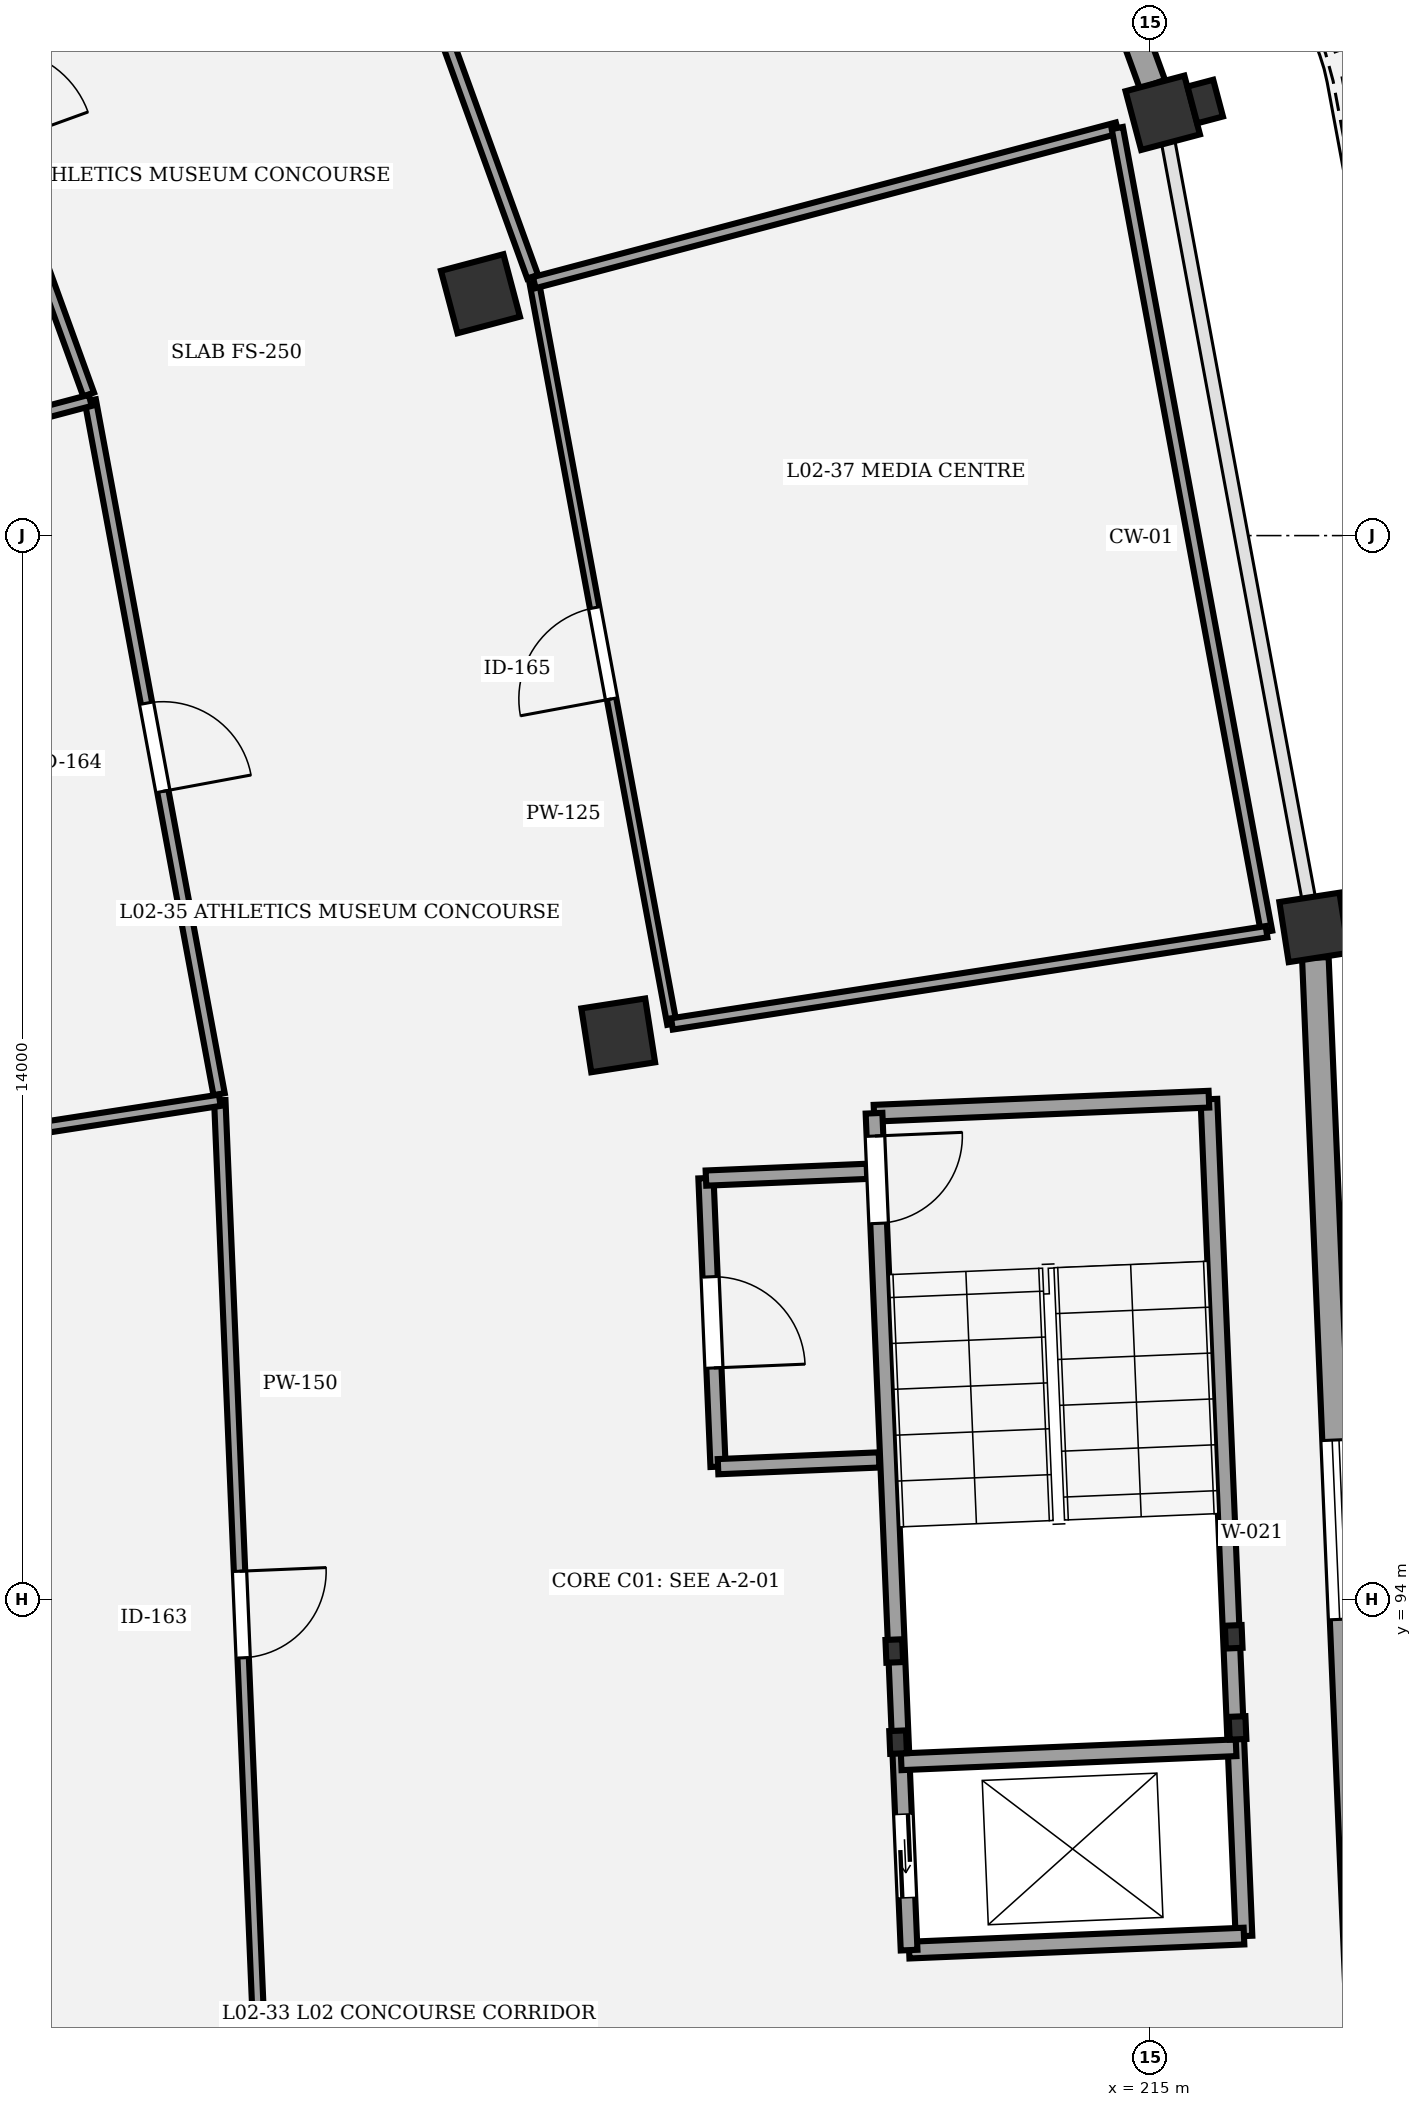
"""IFC4 building model, lengths in metres.
Left out: names, types, materials, properties, quantities, classifications, styles, units other than length and angle.
Written with IfcOpenShell. Run it as: python <this file> out.ifc"""

import sys

from ifc_helpers import new_model, si_unit, direction, frame, frame_2d, origin, origin_2d, place, context, subcontext, project, spatial, rectangle, extrude, element, fill, save


model = new_model("IFC4")
c1 = context("Model", 3, precision=1e-05, world=origin(), true_north=direction((0.0, 1.0)))
c2 = subcontext(c1, "Body", "Model", "MODEL_VIEW")
j1 = project(units=[si_unit("LENGTHUNIT", "METRE"), si_unit("PLANEANGLEUNIT", "RADIAN")], contexts=[c1])
p1 = place(None, origin())
s1 = spatial("IfcSite", under=j1, at=p1, CompositionType="ELEMENT")
p2 = place(p1, origin())
s2 = spatial("IfcBuilding", under=s1, at=p2, CompositionType="ELEMENT")
p3 = place(p2, frame((0.0, 0.0, 10.2)))
s3 = spatial("IfcBuildingStorey", under=s2, at=p3, CompositionType="ELEMENT", Elevation=10.2)
p4 = place(p3, frame((208.0, 101.425, 0.0), z_axis=(0.0, 0.0, 1.0), x_axis=(0.98817491911, 0.153330783737, 0.0)))
e1 = element("IfcColumn", 1, at=p4, inside=s3, PredefinedType="COLUMN", context=c2, shape_type="SweptSolid", body=[
    extrude(rectangle(XDim=0.85, YDim=0.85, at=origin_2d()), origin(), (0.0, 0.0, 1.0), 4.5),
])
p5 = place(p3, frame((217.156, 102.845, 0.0), z_axis=(0.0, 0.0, 1.0), x_axis=(0.98817491911, 0.153330783737, 0.0)))
e2 = element("IfcColumn", 2, at=p5, inside=s3, PredefinedType="COLUMN", context=c2, shape_type="SweptSolid", body=[
    extrude(rectangle(XDim=0.8, YDim=0.8, at=origin_2d()), origin(), (0.0, 0.0, 1.0), 4.5),
])
p6 = place(p3, frame((206.188, 111.182, 0.0), z_axis=(0.0, 0.0, 1.0), x_axis=(0.966600102017, 0.256289373133, 0.0)))
e3 = element("IfcColumn", 3, at=p6, inside=s3, PredefinedType="COLUMN", context=c2, shape_type="SweptSolid", body=[
    extrude(rectangle(XDim=0.85, YDim=0.85, at=origin_2d()), origin(), (0.0, 0.0, 1.0), 4.5),
])
p7 = place(p3, frame((215.165, 113.562, 0.0), z_axis=(0.0, 0.0, 1.0), x_axis=(0.966600102017, 0.256289373133, 0.0)))
e4 = element("IfcColumn", 4, at=p7, inside=s3, PredefinedType="COLUMN", context=c2, shape_type="SweptSolid", body=[
    extrude(rectangle(XDim=0.8, YDim=0.8, at=origin_2d()), origin(), (0.0, 0.0, 1.0), 4.5),
])
p8 = place(p3, frame((215.723, 113.711, 0.0), z_axis=(0.0, 0.0, 1.0), x_axis=(-0.256289373133, 0.966600102017, 0.0)))
e5 = element("IfcColumn", 5, at=p8, inside=s3, PredefinedType="PILASTER", context=c2, shape_type="SweptSolid", body=[
    extrude(rectangle(XDim=0.5, YDim=0.35, at=origin_2d()), origin(), (0.0, 0.0, 1.0), 4.5),
])
p9 = place(p3, frame((217.803, 87.398, 0.0), z_axis=(0.0, 0.0, 1.0), x_axis=(-0.041898189147, 0.99912188533, 0.0)))
e6 = element("IfcWall", 6, at=p9, inside=s3, PredefinedType="STANDARD", context=c2, shape_type="SweptSolid", body=[
    extrude(rectangle(XDim=15.063, YDim=0.35, at=frame_2d((7.531, 0.0))), origin(), (0.0, 0.0, 1.0), 3.42),
])
p10 = place(p9, frame((6.351, 0.0, 0.9)))
e7 = element("IfcOpeningElement", 7, at=p10, cuts=e6, PredefinedType="OPENING", context=c2, shape_type="SweptSolid", body=[
    extrude(rectangle(XDim=2.36, YDim=1.75, at=frame_2d((1.18, 0.875))), frame((0.0, 0.185, 0.0), z_axis=(0.0, -1.0, 0.0), x_axis=(1.0, 0.0, 0.0)), (0.0, 0.0, 1.0), 0.37),
])
p11 = place(p3, frame((211.992, 122.308, 0.0), z_axis=(0.0, 0.0, 1.0), x_axis=(0.34103858998, -0.940049296657, 0.0)))
e8 = element("IfcWall", 8, at=p11, inside=s3, PredefinedType="STANDARD", context=c2, shape_type="SweptSolid", body=[
    extrude(rectangle(XDim=8.906, YDim=0.35, at=frame_2d((4.453, 0.0))), origin(), (0.0, 0.0, 1.0), 3.42),
])
p12 = place(p11, frame((3.553, 0.0, 0.0)))
e9 = element("IfcOpeningElement", 9, at=p12, cuts=e8, PredefinedType="OPENING", context=c2, shape_type="SweptSolid", body=[
    extrude(rectangle(XDim=1.8, YDim=2.4, at=frame_2d((0.9, 1.2))), frame((0.0, 0.185, 0.0), z_axis=(0.0, -1.0, 0.0), x_axis=(1.0, 0.0, 0.0)), (0.0, 0.0, 1.0), 0.37),
])
for number, where, z_axis, x_axis in (
    (10, (211.632, 93.325, 0.0), (0.0, 0.0, 1.0), (0.042, -0.999, 0.0)),
    (11, (211.682, 92.126, 0.0), (0.0, 0.0, 1.0), (0.042, -0.999, 0.0)),
    (12, (216.148, 92.314, 0.0), (0.0, 0.0, 1.0), (0.042, -0.999, 0.0)),
    (13, (216.098, 93.513, 0.0), (0.0, 0.0, 1.0), (0.042, -0.999, 0.0)),
):
    element("IfcColumn", number, at=place(p3, frame(where, z_axis=z_axis, x_axis=x_axis)), inside=s3, PredefinedType="COLUMN", context=c2, shape_type="SweptSolid", body=[
        extrude(rectangle(XDim=0.3, YDim=0.22, at=origin_2d()), origin(), (0.0, 0.0, 1.0), 4.5),
    ])
p13 = place(p3, frame((215.772, 100.585, 0.0), z_axis=(0.0, 0.0, 1.0), x_axis=(0.041871977473, -0.999122984173, 0.0)))
e14 = element("IfcWall", 14, at=p13, inside=s3, PredefinedType="SHEAR", context=c2, shape_type="SweptSolid", body=[
    extrude(rectangle(XDim=11.02, YDim=0.22, at=frame_2d((5.51, 0.0))), origin(), (0.0, 0.0, 1.0), 4.25),
])
for number, where, z_axis, x_axis in (
    (15, (211.365, 100.4, 0.0), (0.0, 0.0, 1.0), (0.999, 0.042, 0.0)),
    (16, (211.827, 89.39, 0.0), (0.0, 0.0, 1.0), (0.999, 0.042, 0.0)),
):
    element("IfcWall", number, at=place(p3, frame(where, z_axis=z_axis, x_axis=x_axis)), inside=s3, PredefinedType="SHEAR", context=c2, shape_type="SweptSolid", body=[
        extrude(rectangle(XDim=4.41, YDim=0.22, at=frame_2d((2.205, 0.0))), origin(), (0.0, 0.0, 1.0), 4.25),
    ])
p14 = place(p3, frame((211.365, 100.4, 0.0), z_axis=(0.0, 0.0, 1.0), x_axis=(0.041871977473, -0.999122984173, 0.0)))
e17 = element("IfcWall", 17, at=p14, inside=s3, PredefinedType="SHEAR", context=c2, shape_type="SweptSolid", body=[
    extrude(rectangle(XDim=11.02, YDim=0.22, at=frame_2d((5.51, 0.0))), origin(), (0.0, 0.0, 1.0), 4.25),
])
p15 = place(p14, frame((0.3, 0.0, 0.0)))
e18 = element("IfcOpeningElement", 18, at=p15, cuts=e17, PredefinedType="OPENING", context=c2, shape_type="SweptSolid", body=[
    extrude(rectangle(XDim=1.15, YDim=2.15, at=frame_2d((0.575, 1.075))), frame((0.0, 0.12, 0.0), z_axis=(0.0, -1.0, 0.0), x_axis=(1.0, 0.0, 0.0)), (0.0, 0.0, 1.0), 0.24),
])
p16 = place(p14, frame((9.23, 0.0, 0.0)))
e19 = element("IfcOpeningElement", 19, at=p16, cuts=e17, PredefinedType="OPENING", context=c2, shape_type="SweptSolid", body=[
    extrude(rectangle(XDim=1.1, YDim=2.15, at=frame_2d((0.55, 1.075))), frame((0.0, 0.12, 0.0), z_axis=(0.0, -1.0, 0.0), x_axis=(1.0, 0.0, 0.0)), (0.0, 0.0, 1.0), 0.24),
])
p17 = place(p3, frame((211.723, 91.868, 0.0), z_axis=(0.0, 0.0, 1.0), x_axis=(0.999121521721, 0.041906859039, 0.0)))
e20 = element("IfcWall", 20, at=p17, inside=s3, PredefinedType="SHEAR", context=c2, shape_type="SweptSolid", body=[
    extrude(rectangle(XDim=4.41, YDim=0.22, at=frame_2d((2.205, 0.0))), origin(), (0.0, 0.0, 1.0), 4.25),
])
p18 = place(p3, frame((209.154, 99.547, 0.0), z_axis=(0.0, 0.0, 1.0), x_axis=(0.041889762691, -0.999122238658, 0.0)))
e21 = element("IfcWall", 21, at=p18, inside=s3, PredefinedType="PARTITIONING", context=c2, shape_type="SweptSolid", body=[
    extrude(rectangle(XDim=3.8, YDim=0.2, at=frame_2d((1.9, 0.0))), origin(), (0.0, 0.0, 1.0), 3.35),
])
p19 = place(p18, frame((1.3, 0.0, 0.0)))
e22 = element("IfcOpeningElement", 22, at=p19, cuts=e21, PredefinedType="OPENING", context=c2, shape_type="SweptSolid", body=[
    extrude(rectangle(XDim=1.2, YDim=2.18, at=frame_2d((0.6, 1.09))), frame((0.0, 0.11, 0.0), z_axis=(0.0, -1.0, 0.0), x_axis=(1.0, 0.0, 0.0)), (0.0, 0.0, 1.0), 0.22),
])
for number, where, z_axis, x_axis in (
    (23, (209.154, 99.547, 0.0), (0.0, 0.0, 1.0), (0.999, 0.042, 0.0)),
    (24, (209.313, 95.75, 0.0), (0.0, 0.0, 1.0), (0.999, 0.042, 0.0)),
):
    element("IfcWall", number, at=place(p3, frame(where, z_axis=z_axis, x_axis=x_axis)), inside=s3, PredefinedType="PARTITIONING", context=c2, shape_type="SweptSolid", body=[
        extrude(rectangle(XDim=2.12, YDim=0.2, at=frame_2d((1.06, 0.0))), origin(), (0.0, 0.0, 1.0), 3.35),
    ])
p20 = place(p3, frame((202.758, 100.571, 0.0), z_axis=(0.0, 0.0, 1.0), x_axis=(0.041894479342, -0.999122040894, 0.0)))
e25 = element("IfcWall", 25, at=p20, inside=s3, PredefinedType="PARTITIONING", context=c2, shape_type="SweptSolid", body=[
    extrude(rectangle(XDim=13.543, YDim=0.15, at=frame_2d((6.771, 0.0))), origin(), (0.0, 0.0, 1.0), 3.25),
])
p21 = place(p20, frame((6.202, 0.0, 0.0)))
e26 = element("IfcOpeningElement", 26, at=p21, cuts=e25, PredefinedType="OPENING", context=c2, shape_type="SweptSolid", body=[
    extrude(rectangle(XDim=1.14, YDim=2.2, at=frame_2d((0.57, 1.1))), frame((0.0, 0.085, 0.0), z_axis=(0.0, -1.0, 0.0), x_axis=(1.0, 0.0, 0.0)), (0.0, 0.0, 1.0), 0.17),
])
p22 = place(p3, frame((201.053, 109.779, 0.0), z_axis=(0.0, 0.0, 1.0), x_axis=(0.182600545941, -0.983187184936, 0.0)))
e27 = element("IfcWall", 27, at=p22, inside=s3, PredefinedType="PARTITIONING", context=c2, shape_type="SweptSolid", body=[
    extrude(rectangle(XDim=9.284, YDim=0.15, at=frame_2d((4.642, 0.0))), origin(), (0.0, 0.0, 1.0), 3.25),
])
p23 = place(p22, frame((4.052, 0.0, 0.0)))
e28 = element("IfcOpeningElement", 28, at=p23, cuts=e27, PredefinedType="OPENING", context=c2, shape_type="SweptSolid", body=[
    extrude(rectangle(XDim=1.18, YDim=2.2, at=frame_2d((0.59, 1.1))), frame((0.0, 0.085, 0.0), z_axis=(0.0, -1.0, 0.0), x_axis=(1.0, 0.0, 0.0)), (0.0, 0.0, 1.0), 0.17),
])
p24 = place(p3, frame((208.707, 101.575, 0.0), z_axis=(0.0, 0.0, 1.0), x_axis=(-0.182618024057, 0.983183938686, 0.0)))
e29 = element("IfcWall", 29, at=p24, inside=s3, PredefinedType="PARTITIONING", context=c2, shape_type="SweptSolid", body=[
    extrude(rectangle(XDim=9.92, YDim=0.125, at=frame_2d((4.96, 0.0))), origin(), (0.0, 0.0, 1.0), 3.25),
])
p25 = place(p24, frame((4.35, 0.0, 0.0)))
e30 = element("IfcOpeningElement", 30, at=p25, cuts=e29, PredefinedType="OPENING", context=c2, shape_type="SweptSolid", body=[
    extrude(rectangle(XDim=1.22, YDim=2.2, at=frame_2d((0.61, 1.1))), frame((0.0, 0.073, 0.0), z_axis=(0.0, -1.0, 0.0), x_axis=(1.0, 0.0, 0.0)), (0.0, 0.0, 1.0), 0.145),
])
p26 = place(p3, frame((198.218, 117.615, 0.0), z_axis=(0.0, 0.0, 1.0), x_axis=(0.341044733968, -0.940047067669, 0.0)))
e31 = element("IfcWall", 31, at=p26, inside=s3, PredefinedType="PARTITIONING", context=c2, shape_type="SweptSolid", body=[
    extrude(rectangle(XDim=8.254, YDim=0.15, at=frame_2d((4.127, 0.0))), origin(), (0.0, 0.0, 1.0), 3.25),
])
p27 = place(p26, frame((3.497, 0.0, 0.0)))
e32 = element("IfcOpeningElement", 32, at=p27, cuts=e31, PredefinedType="OPENING", context=c2, shape_type="SweptSolid", body=[
    extrude(rectangle(XDim=1.26, YDim=2.2, at=frame_2d((0.63, 1.1))), frame((0.0, 0.085, 0.0), z_axis=(0.0, -1.0, 0.0), x_axis=(1.0, 0.0, 0.0)), (0.0, 0.0, 1.0), 0.17),
])
p28 = place(p3, frame((206.874, 111.405, 0.0), z_axis=(0.0, 0.0, 1.0), x_axis=(-0.341031741571, 0.940051781149, 0.0)))
e33 = element("IfcWall", 33, at=p28, inside=s3, PredefinedType="PARTITIONING", context=c2, shape_type="SweptSolid", body=[
    extrude(rectangle(XDim=8.82, YDim=0.15, at=frame_2d((4.41, 0.0))), origin(), (0.0, 0.0, 1.0), 3.25),
])
p29 = place(p28, frame((3.75, 0.0, 0.0)))
e34 = element("IfcOpeningElement", 34, at=p29, cuts=e33, PredefinedType="OPENING", context=c2, shape_type="SweptSolid", body=[
    extrude(rectangle(XDim=1.32, YDim=2.2, at=frame_2d((0.66, 1.1))), frame((0.0, 0.085, 0.0), z_axis=(0.0, -1.0, 0.0), x_axis=(1.0, 0.0, 0.0)), (0.0, 0.0, 1.0), 0.17),
])
p30 = place(p3, frame((193.682, 99.164, 0.0), z_axis=(0.0, 0.0, 1.0), x_axis=(0.988188135357, 0.153245584407, 0.0)))
e35 = element("IfcWall", 35, at=p30, inside=s3, PredefinedType="PARTITIONING", context=c2, shape_type="SweptSolid", body=[
    extrude(rectangle(XDim=9.184, YDim=0.15, at=frame_2d((4.592, 0.0))), origin(), (0.0, 0.0, 1.0), 3.25),
])
p31 = place(p3, frame((192.154, 107.419, 0.0), z_axis=(0.0, 0.0, 1.0), x_axis=(0.96658744027, 0.256337122383, 0.0)))
e36 = element("IfcWall", 36, at=p31, inside=s3, PredefinedType="PARTITIONING", context=c2, shape_type="SweptSolid", body=[
    extrude(rectangle(XDim=9.207, YDim=0.15, at=frame_2d((4.604, 0.0))), origin(), (0.0, 0.0, 1.0), 3.25),
])
p32 = place(p3, frame((206.895, 111.328, 0.0), z_axis=(0.0, 0.0, 1.0), x_axis=(0.966593450181, 0.25631445934, 0.0)))
e37 = element("IfcWall", 37, at=p32, inside=s3, PredefinedType="PARTITIONING", context=c2, shape_type="SweptSolid", body=[
    extrude(rectangle(XDim=7.936, YDim=0.15, at=frame_2d((3.968, 0.0))), origin(), (0.0, 0.0, 1.0), 3.25),
])
p33 = place(p3, frame((214.566, 113.362, 0.0), z_axis=(0.0, 0.0, 1.0), x_axis=(0.182607868301, -0.983185824976, 0.0)))
e38 = element("IfcWall", 38, at=p33, inside=s3, PredefinedType="PARTITIONING", context=c2, shape_type="SweptSolid", body=[
    extrude(rectangle(XDim=10.755, YDim=0.15, at=frame_2d((5.377, 0.0))), origin(), (0.0, 0.0, 1.0), 3.25),
])
p34 = place(p3, frame((216.53, 102.789, 0.0), z_axis=(0.0, 0.0, 1.0), x_axis=(-0.988185582016, -0.153262048451, 0.0)))
e39 = element("IfcWall", 39, at=p34, inside=s3, PredefinedType="PARTITIONING", context=c2, shape_type="SweptSolid", body=[
    extrude(rectangle(XDim=7.917, YDim=0.15, at=frame_2d((3.958, 0.0))), origin(), (0.0, 0.0, 1.0), 3.25),
])
p35 = place(p10, origin())
e40 = element("IfcWindow", 40, at=p35, inside=s3, PartitioningType="SINGLE_PANEL", PredefinedType="WINDOW", context=c2, shape_type="SweptSolid", body=[
    extrude(rectangle(XDim=2.36, YDim=1.75, at=frame_2d((1.18, 0.875))), frame((0.0, 0.03, 0.0), z_axis=(0.0, -1.0, 0.0), x_axis=(1.0, 0.0, 0.0)), (0.0, 0.0, 1.0), 0.06),
])
fill(e7, e40)
p36 = place(p15, origin())
e41 = element("IfcDoor", 41, at=p36, inside=s3, OperationType="SINGLE_SWING_LEFT", PredefinedType="DOOR", context=c2, shape_type="SweptSolid", body=[
    extrude(rectangle(XDim=1.15, YDim=2.15, at=frame_2d((0.575, 1.075))), frame((0.0, 0.025, 0.0), z_axis=(0.0, -1.0, 0.0), x_axis=(1.0, 0.0, 0.0)), (0.0, 0.0, 1.0), 0.05),
])
fill(e18, e41)
p37 = place(p16, origin())
e42 = element("IfcDoor", 42, at=p37, inside=s3, OperationType="DOUBLE_DOOR_SLIDING", PredefinedType="DOOR", context=c2, shape_type="SweptSolid", body=[
    extrude(rectangle(XDim=1.1, YDim=2.15, at=frame_2d((0.55, 1.075))), frame((0.0, 0.025, 0.0), z_axis=(0.0, -1.0, 0.0), x_axis=(1.0, 0.0, 0.0)), (0.0, 0.0, 1.0), 0.05),
])
fill(e19, e42)
p38 = place(p19, origin())
e43 = element("IfcDoor", 43, at=p38, inside=s3, OperationType="SINGLE_SWING_RIGHT", PredefinedType="DOOR", context=c2, shape_type="SweptSolid", body=[
    extrude(rectangle(XDim=1.2, YDim=2.18, at=frame_2d((0.6, 1.09))), frame((0.0, 0.025, 0.0), z_axis=(0.0, -1.0, 0.0), x_axis=(1.0, 0.0, 0.0)), (0.0, 0.0, 1.0), 0.05),
])
fill(e22, e43)
p39 = place(p21, origin())
e44 = element("IfcDoor", 44, at=p39, inside=s3, OperationType="SINGLE_SWING_LEFT", PredefinedType="DOOR", context=c2, shape_type="SweptSolid", body=[
    extrude(rectangle(XDim=1.14, YDim=2.2, at=frame_2d((0.57, 1.1))), frame((0.0, 0.025, 0.0), z_axis=(0.0, -1.0, 0.0), x_axis=(1.0, 0.0, 0.0)), (0.0, 0.0, 1.0), 0.05),
])
fill(e26, e44)
p40 = place(p23, origin())
e45 = element("IfcDoor", 45, at=p40, inside=s3, OperationType="SINGLE_SWING_RIGHT", PredefinedType="DOOR", context=c2, shape_type="SweptSolid", body=[
    extrude(rectangle(XDim=1.18, YDim=2.2, at=frame_2d((0.59, 1.1))), frame((0.0, 0.025, 0.0), z_axis=(0.0, -1.0, 0.0), x_axis=(1.0, 0.0, 0.0)), (0.0, 0.0, 1.0), 0.05),
])
fill(e28, e45)
p41 = place(p25, origin())
e46 = element("IfcDoor", 46, at=p41, inside=s3, OperationType="SINGLE_SWING_LEFT", PredefinedType="DOOR", context=c2, shape_type="SweptSolid", body=[
    extrude(rectangle(XDim=1.22, YDim=2.2, at=frame_2d((0.61, 1.1))), frame((0.0, 0.025, 0.0), z_axis=(0.0, -1.0, 0.0), x_axis=(1.0, 0.0, 0.0)), (0.0, 0.0, 1.0), 0.05),
])
fill(e30, e46)
save(model, sys.argv[1])
